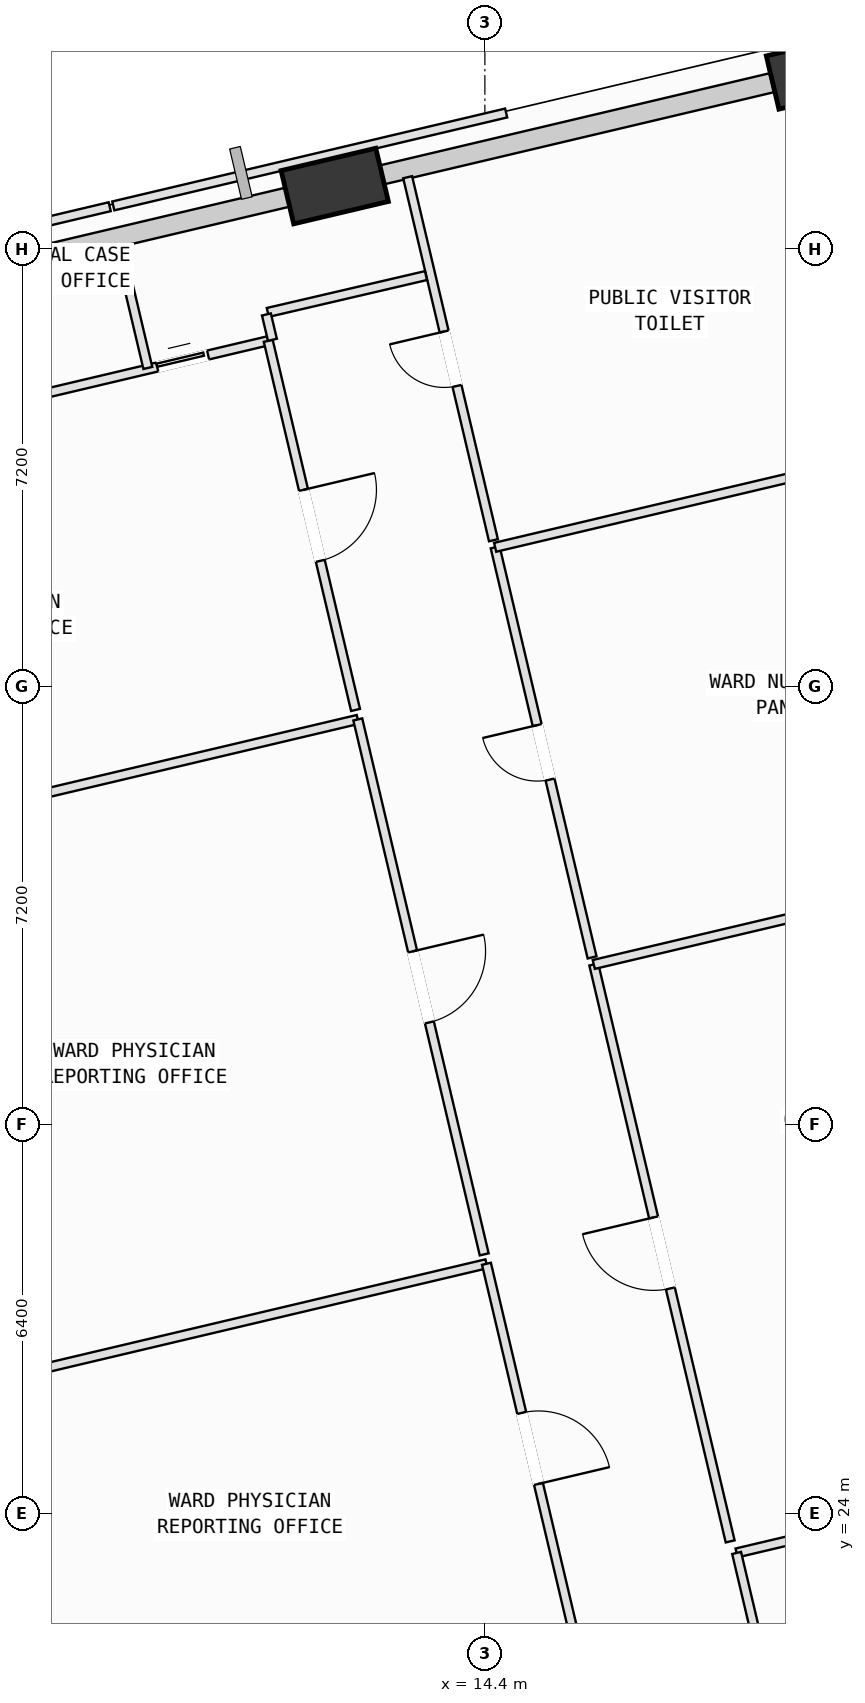
"""IFC4 building model, lengths in metres.
Left out: names, types, materials, properties, quantities, classifications, styles, units other than length and angle.
Written with IfcOpenShell. Run it as: python <this file> out.ifc"""

import sys

from ifc_helpers import new_model, si_unit, direction, frame, frame_2d, origin, origin_2d, place, context, subcontext, project, spatial, rectangle, extrude, element, fill, save


model = new_model("IFC4")
c1 = context("Model", 3, precision=1e-05, world=origin(), true_north=direction((0.0, 1.0)))
c2 = subcontext(c1, "Body", "Model", "MODEL_VIEW")
j1 = project(units=[si_unit("LENGTHUNIT", "METRE"), si_unit("PLANEANGLEUNIT", "RADIAN")], contexts=[c1])
p1 = place(None, origin())
s1 = spatial("IfcSite", under=j1, at=p1, CompositionType="ELEMENT")
p2 = place(p1, origin())
s2 = spatial("IfcBuilding", under=s1, at=p2, CompositionType="ELEMENT")
p3 = place(p2, frame((0.0, 0.0, 79.0)))
s3 = spatial("IfcBuildingStorey", under=s2, at=p3, CompositionType="ELEMENT", Elevation=79.0)
p4 = place(p3, frame((19.911, 47.715, 0.002), z_axis=(-0.0939135141, -0.057151316147, 0.993938619298), x_axis=(0.701244074695, -0.712472540273, 0.025290849368)))
e1 = element("IfcColumn", 1, at=p4, inside=s3, PredefinedType="COLUMN", context=c2, shape_type="SweptSolid", body=[
    extrude(rectangle(XDim=1.6, YDim=0.9, at=origin_2d()), origin(), (0.0, 0.0, 1.0), 3.951),
])
p5 = place(p3, frame((11.931, 45.829, 0.002), z_axis=(-0.085748490586, -0.08982880809, 0.992259029487), x_axis=(0.861560195965, -0.506850916025, 0.028568823104)))
e2 = element("IfcColumn", 2, at=p5, inside=s3, PredefinedType="COLUMN", context=c2, shape_type="SweptSolid", body=[
    extrude(rectangle(XDim=1.6, YDim=0.9, at=origin_2d()), origin(), (0.0, 0.0, 1.0), 3.949),
])
p6 = place(p3, frame((12.303, 45.917, 0.0), z_axis=(0.0, 0.0, 1.0), x_axis=(0.973179362637, 0.230047664925, 0.0)))
e3 = element("IfcWall", 3, at=p6, inside=s3, PredefinedType="SOLIDWALL", context=c2, shape_type="SweptSolid", body=[
    extrude(rectangle(XDim=7.003, YDim=0.32, at=frame_2d((3.501, 0.0))), origin(), (0.0, 0.0, 1.0), 3.085),
])
p7 = place(p3, frame((4.304, 44.026, 0.0), z_axis=(0.0, 0.0, 1.0), x_axis=(0.973175854212, 0.230062506243, 0.0)))
e4 = element("IfcWall", 4, at=p7, inside=s3, PredefinedType="SOLIDWALL", context=c2, shape_type="SweptSolid", body=[
    extrude(rectangle(XDim=7.035, YDim=0.32, at=frame_2d((3.517, 0.0))), origin(), (0.0, 0.0, 1.0), 3.085),
])
p8 = place(p3, frame((5.263, 25.937, 0.0), z_axis=(0.0, 0.0, 1.0), x_axis=(0.973179969002, 0.230045099781, 0.0)))
e5 = element("IfcWall", 5, at=p8, inside=s3, PredefinedType="PARTITIONING", context=c2, shape_type="SweptSolid", body=[
    extrude(rectangle(XDim=9.416, YDim=0.15, at=frame_2d((4.708, 0.0))), origin(), (0.0, 0.0, 1.0), 3.7),
])
p9 = place(p3, frame((14.426, 28.103, 0.0), z_axis=(0.0, 0.0, 1.0), x_axis=(0.229968189108, -0.973198146319, 0.0)))
e6 = element("IfcWall", 6, at=p9, inside=s3, PredefinedType="PARTITIONING", context=c2, shape_type="SweptSolid", body=[
    extrude(rectangle(XDim=6.24, YDim=0.15, at=frame_2d((3.12, 0.0))), origin(), (0.0, 0.0, 1.0), 3.7),
])
p10 = place(p9, frame((2.52, 0.0, 0.0)))
e7 = element("IfcOpeningElement", 7, at=p10, cuts=e6, PredefinedType="OPENING", context=c2, shape_type="SweptSolid", body=[
    extrude(rectangle(XDim=1.2, YDim=2.15, at=frame_2d((0.6, 1.075))), frame((0.0, 0.085, 0.0), z_axis=(0.0, -1.0, 0.0), x_axis=(1.0, 0.0, 0.0)), (0.0, 0.0, 1.0), 0.17),
])
p11 = place(p3, frame((3.147, 34.89, 0.0), z_axis=(0.0, 0.0, 1.0), x_axis=(0.973179969002, 0.230045099781, 0.0)))
e8 = element("IfcWall", 8, at=p11, inside=s3, PredefinedType="PARTITIONING", context=c2, shape_type="SweptSolid", body=[
    extrude(rectangle(XDim=9.416, YDim=0.15, at=frame_2d((4.708, 0.0))), origin(), (0.0, 0.0, 1.0), 3.7),
])
p12 = place(p3, frame((12.31, 37.056, 0.0), z_axis=(0.0, 0.0, 1.0), x_axis=(0.229958952192, -0.97320032897, 0.0)))
e9 = element("IfcWall", 9, at=p12, inside=s3, PredefinedType="PARTITIONING", context=c2, shape_type="SweptSolid", body=[
    extrude(rectangle(XDim=9.04, YDim=0.15, at=frame_2d((4.52, 0.0))), origin(), (0.0, 0.0, 1.0), 2.785),
])
p13 = place(p12, frame((3.92, 0.0, 0.0)))
e10 = element("IfcOpeningElement", 10, at=p13, cuts=e9, PredefinedType="OPENING", context=c2, shape_type="SweptSolid", body=[
    extrude(rectangle(XDim=1.2, YDim=2.15, at=frame_2d((0.6, 1.075))), frame((0.0, 0.085, 0.0), z_axis=(0.0, -1.0, 0.0), x_axis=(1.0, 0.0, 0.0)), (0.0, 0.0, 1.0), 0.17),
])
p14 = place(p3, frame((2.942, 41.418, 0.0), z_axis=(0.0, 0.0, 1.0), x_axis=(0.973188164801, 0.230010425616, 0.0)))
e11 = element("IfcWall", 11, at=p14, inside=s3, PredefinedType="PARTITIONING", context=c2, shape_type="SweptSolid", body=[
    extrude(rectangle(XDim=8.113, YDim=0.15, at=frame_2d((4.056, 0.0))), origin(), (0.0, 0.0, 1.0), 3.7),
])
p15 = place(p14, frame((3.426, 0.0, 0.0)))
e12 = element("IfcOpeningElement", 12, at=p15, cuts=e11, PredefinedType="OPENING", context=c2, shape_type="SweptSolid", body=[
    extrude(rectangle(XDim=0.86, YDim=2.06, at=frame_2d((0.43, 1.03))), frame((0.0, 0.085, 0.0), z_axis=(0.0, -1.0, 0.0), x_axis=(1.0, 0.0, 0.0)), (0.0, 0.0, 1.0), 0.17),
])
p16 = place(p14, frame((6.236, 0.0, 0.0)))
e13 = element("IfcOpeningElement", 13, at=p16, cuts=e11, PredefinedType="OPENING", context=c2, shape_type="SweptSolid", body=[
    extrude(rectangle(XDim=0.86, YDim=2.06, at=frame_2d((0.43, 1.03))), frame((0.0, 0.085, 0.0), z_axis=(0.0, -1.0, 0.0), x_axis=(1.0, 0.0, 0.0)), (0.0, 0.0, 1.0), 0.17),
])
p17 = place(p3, frame((10.837, 43.284, 0.0), z_axis=(0.0, 0.0, 1.0), x_axis=(0.230151448384, -0.973154823657, 0.0)))
e14 = element("IfcWall", 14, at=p17, inside=s3, PredefinedType="PARTITIONING", context=c2, shape_type="SweptSolid", body=[
    extrude(rectangle(XDim=6.24, YDim=0.15, at=frame_2d((3.12, 0.0))), origin(), (0.0, 0.0, 1.0), 2.785),
])
p18 = place(p17, frame((2.52, 0.0, 0.0)))
e15 = element("IfcOpeningElement", 15, at=p18, cuts=e14, PredefinedType="OPENING", context=c2, shape_type="SweptSolid", body=[
    extrude(rectangle(XDim=1.2, YDim=2.15, at=frame_2d((0.6, 1.075))), frame((0.0, 0.085, 0.0), z_axis=(0.0, -1.0, 0.0), x_axis=(1.0, 0.0, 0.0)), (0.0, 0.0, 1.0), 0.17),
])
p19 = place(p3, frame((18.54, 23.347, 0.0), z_axis=(0.0, 0.0, 1.0), x_axis=(0.97319466158, 0.229982935611, 0.0)))
e16 = element("IfcWall", 16, at=p19, inside=s3, PredefinedType="PARTITIONING", context=c2, shape_type="SweptSolid", body=[
    extrude(rectangle(XDim=8.306, YDim=0.15, at=frame_2d((4.153, 0.0))), origin(), (0.0, 0.0, 1.0), 3.7),
])
p20 = place(p3, frame((19.194, 20.58, 0.0), z_axis=(0.0, 0.0, 1.0), x_axis=(-0.230049112819, 0.973179020372, 0.0)))
e17 = element("IfcWall", 17, at=p20, inside=s3, PredefinedType="PARTITIONING", context=c2, shape_type="SweptSolid", body=[
    extrude(rectangle(XDim=2.843, YDim=0.15, at=frame_2d((1.421, 0.0))), origin(), (0.0, 0.0, 1.0), 3.7),
])
p21 = place(p3, frame((18.434, 23.537, 0.0), z_axis=(0.0, 0.0, 1.0), x_axis=(-0.23006080979, 0.973176255258, 0.0)))
e18 = element("IfcWall", 18, at=p21, inside=s3, PredefinedType="PARTITIONING", context=c2, shape_type="SweptSolid", body=[
    extrude(rectangle(XDim=9.75, YDim=0.15, at=frame_2d((4.875, 0.0))), origin(), (0.0, 0.0, 1.0), 3.7),
])
p22 = place(p21, frame((4.275, 0.0, 0.0)))
e19 = element("IfcOpeningElement", 19, at=p22, cuts=e18, PredefinedType="OPENING", context=c2, shape_type="SweptSolid", body=[
    extrude(rectangle(XDim=1.2, YDim=2.15, at=frame_2d((0.6, 1.075))), frame((0.0, 0.085, 0.0), z_axis=(0.0, -1.0, 0.0), x_axis=(1.0, 0.0, 0.0)), (0.0, 0.0, 1.0), 0.17),
])
p23 = place(p3, frame((16.191, 33.026, 0.0), z_axis=(0.0, 0.0, 1.0), x_axis=(0.973183543578, 0.230029977414, 0.0)))
e20 = element("IfcWall", 20, at=p23, inside=s3, PredefinedType="PARTITIONING", context=c2, shape_type="SweptSolid", body=[
    extrude(rectangle(XDim=8.365, YDim=0.15, at=frame_2d((4.182, 0.0))), origin(), (0.0, 0.0, 1.0), 3.7),
])
p24 = place(p3, frame((16.163, 33.142, 0.0), z_axis=(0.0, 0.0, 1.0), x_axis=(-0.229991484935, 0.973192641185, 0.0)))
e21 = element("IfcWall", 21, at=p24, inside=s3, PredefinedType="PARTITIONING", context=c2, shape_type="SweptSolid", body=[
    extrude(rectangle(XDim=6.931, YDim=0.15, at=frame_2d((3.465, 0.0))), origin(), (0.0, 0.0, 1.0), 3.7),
])
p25 = place(p24, frame((3.005, 0.0, 0.0)))
e22 = element("IfcOpeningElement", 22, at=p25, cuts=e21, PredefinedType="OPENING", context=c2, shape_type="SweptSolid", body=[
    extrude(rectangle(XDim=0.92, YDim=2.1, at=frame_2d((0.46, 1.05))), frame((0.0, 0.085, 0.0), z_axis=(0.0, -1.0, 0.0), x_axis=(1.0, 0.0, 0.0)), (0.0, 0.0, 1.0), 0.17),
])
p26 = place(p3, frame((14.569, 39.887, 0.0), z_axis=(0.0, 0.0, 1.0), x_axis=(0.973198198555, 0.229967968052, 0.0)))
e23 = element("IfcWall", 23, at=p26, inside=s3, PredefinedType="PARTITIONING", context=c2, shape_type="SweptSolid", body=[
    extrude(rectangle(XDim=8.41, YDim=0.15, at=frame_2d((4.205, 0.0))), origin(), (0.0, 0.0, 1.0), 3.7),
])
p27 = place(p3, frame((14.541, 40.003, 0.0), z_axis=(0.0, 0.0, 1.0), x_axis=(-0.229988453932, 0.973193357488, 0.0)))
e24 = element("IfcWall", 24, at=p27, inside=s3, PredefinedType="PARTITIONING", context=c2, shape_type="SweptSolid", body=[
    extrude(rectangle(XDim=6.136, YDim=0.15, at=frame_2d((3.068, 0.0))), origin(), (0.0, 0.0, 1.0), 3.7),
])
p28 = place(p27, frame((2.608, 0.0, 0.0)))
e25 = element("IfcOpeningElement", 25, at=p28, cuts=e24, PredefinedType="OPENING", context=c2, shape_type="SweptSolid", body=[
    extrude(rectangle(XDim=0.92, YDim=2.1, at=frame_2d((0.46, 1.05))), frame((0.0, 0.085, 0.0), z_axis=(0.0, -1.0, 0.0), x_axis=(1.0, 0.0, 0.0)), (0.0, 0.0, 1.0), 0.17),
])
p29 = place(p3, frame((19.075, 47.713, 0.0), z_axis=(0.0, 0.0, 1.0), x_axis=(0.973137266484, 0.230225673155, 0.0)))
e26 = element("IfcWall", 26, at=p29, inside=s3, PredefinedType="PARTITIONING", context=c2, shape_type="SweptSolid", body=[
    extrude(rectangle(XDim=1.365, YDim=0.15, at=frame_2d((0.682, 0.0))), origin(), (0.0, 0.0, 1.0), 3.085),
])
p30 = place(p3, frame((3.296, 44.322, 0.0), z_axis=(0.0, 0.0, 1.0), x_axis=(0.973151285145, 0.230166409846, 0.0)))
e27 = element("IfcWall", 27, at=p30, inside=s3, PredefinedType="PARTITIONING", context=c2, shape_type="SweptSolid", body=[
    extrude(rectangle(XDim=5.07, YDim=0.15, at=frame_2d((2.535, 0.0))), origin(), (0.0, 0.0, 1.0), 3.7),
])
p31 = place(p3, frame((8.381, 44.851, 0.0), z_axis=(0.0, 0.0, 1.0), x_axis=(0.22991372917, -0.973211013675, 0.0)))
e28 = element("IfcWall", 28, at=p31, inside=s3, PredefinedType="PARTITIONING", context=c2, shape_type="SweptSolid", body=[
    extrude(rectangle(XDim=2.07, YDim=0.15, at=frame_2d((1.035, 0.0))), origin(), (0.0, 0.0, 1.0), 3.7),
])
p32 = place(p3, frame((13.431, 44.356, 0.0), z_axis=(0.0, 0.0, 1.0), x_axis=(-0.973916009073, -0.226908808272, 0.0)))
e29 = element("IfcWall", 29, at=p32, inside=s3, PredefinedType="PARTITIONING", context=c2, shape_type="SweptSolid", body=[
    extrude(rectangle(XDim=2.67, YDim=0.15, at=frame_2d((1.335, 0.0))), origin(), (0.0, 0.0, 1.0), 3.7),
])
p33 = place(p3, frame((10.807, 43.717, 0.0), z_axis=(0.0, 0.0, 1.0), x_axis=(0.23126114462, -0.972891711851, 0.0)))
e30 = element("IfcWall", 30, at=p33, inside=s3, PredefinedType="PARTITIONING", context=c2, shape_type="SweptSolid", body=[
    extrude(rectangle(XDim=0.429, YDim=0.15, at=frame_2d((0.214, 0.0))), origin(), (0.0, 0.0, 1.0), 3.7),
])
p34 = place(p3, frame((8.289, 45.502, 0.0), z_axis=(0.0, 0.0, 1.0), x_axis=(0.973152723779, 0.230160327166, 0.0)))
e31 = element("IfcWall", 31, at=p34, inside=s3, PredefinedType="PARTITIONING", context=c2, shape_type="SweptSolid", body=[
    extrude(rectangle(XDim=6.639, YDim=0.15, at=frame_2d((3.32, 0.0))), origin(), (0.0, 0.0, 1.0), 3.7),
])
p35 = place(p10, origin())
e32 = element("IfcDoor", 32, at=p35, inside=s3, OperationType="SINGLE_SWING_RIGHT", PredefinedType="DOOR", context=c2, shape_type="SweptSolid", body=[
    extrude(rectangle(XDim=1.2, YDim=2.15, at=frame_2d((0.6, 1.075))), frame((0.0, 0.025, 0.0), z_axis=(0.0, -1.0, 0.0), x_axis=(1.0, 0.0, 0.0)), (0.0, 0.0, 1.0), 0.05),
])
fill(e7, e32)
p36 = place(p13, origin())
e33 = element("IfcDoor", 33, at=p36, inside=s3, OperationType="SINGLE_SWING_LEFT", PredefinedType="DOOR", context=c2, shape_type="SweptSolid", body=[
    extrude(rectangle(XDim=1.2, YDim=2.15, at=frame_2d((0.6, 1.075))), frame((0.0, 0.025, 0.0), z_axis=(0.0, -1.0, 0.0), x_axis=(1.0, 0.0, 0.0)), (0.0, 0.0, 1.0), 0.05),
])
fill(e10, e33)
p37 = place(p18, origin())
e34 = element("IfcDoor", 34, at=p37, inside=s3, OperationType="SINGLE_SWING_LEFT", PredefinedType="DOOR", context=c2, shape_type="SweptSolid", body=[
    extrude(rectangle(XDim=1.2, YDim=2.15, at=frame_2d((0.6, 1.075))), frame((0.0, 0.025, 0.0), z_axis=(0.0, -1.0, 0.0), x_axis=(1.0, 0.0, 0.0)), (0.0, 0.0, 1.0), 0.05),
])
fill(e15, e34)
p38 = place(p22, origin())
e35 = element("IfcDoor", 35, at=p38, inside=s3, OperationType="SINGLE_SWING_RIGHT", PredefinedType="DOOR", context=c2, shape_type="SweptSolid", body=[
    extrude(rectangle(XDim=1.2, YDim=2.15, at=frame_2d((0.6, 1.075))), frame((0.0, 0.025, 0.0), z_axis=(0.0, -1.0, 0.0), x_axis=(1.0, 0.0, 0.0)), (0.0, 0.0, 1.0), 0.05),
])
fill(e19, e35)
p39 = place(p25, origin())
e36 = element("IfcDoor", 36, at=p39, inside=s3, OperationType="SINGLE_SWING_RIGHT", PredefinedType="DOOR", context=c2, shape_type="SweptSolid", body=[
    extrude(rectangle(XDim=0.92, YDim=2.1, at=frame_2d((0.46, 1.05))), frame((0.0, 0.025, 0.0), z_axis=(0.0, -1.0, 0.0), x_axis=(1.0, 0.0, 0.0)), (0.0, 0.0, 1.0), 0.05),
])
fill(e22, e36)
p40 = place(p28, origin())
e37 = element("IfcDoor", 37, at=p40, inside=s3, OperationType="SINGLE_SWING_RIGHT", PredefinedType="DOOR", context=c2, shape_type="SweptSolid", body=[
    extrude(rectangle(XDim=0.92, YDim=2.1, at=frame_2d((0.46, 1.05))), frame((0.0, 0.025, 0.0), z_axis=(0.0, -1.0, 0.0), x_axis=(1.0, 0.0, 0.0)), (0.0, 0.0, 1.0), 0.05),
])
fill(e25, e37)
p41 = place(p16, origin())
e38 = element("IfcDoor", 38, at=p41, inside=s3, OperationType="SLIDING_TO_LEFT", PredefinedType="DOOR", context=c2, shape_type="SweptSolid", body=[
    extrude(rectangle(XDim=0.86, YDim=2.06, at=frame_2d((0.43, 1.03))), frame((0.0, 0.025, 0.0), z_axis=(0.0, -1.0, 0.0), x_axis=(1.0, 0.0, 0.0)), (0.0, 0.0, 1.0), 0.05),
])
fill(e13, e38)
save(model, sys.argv[1])
